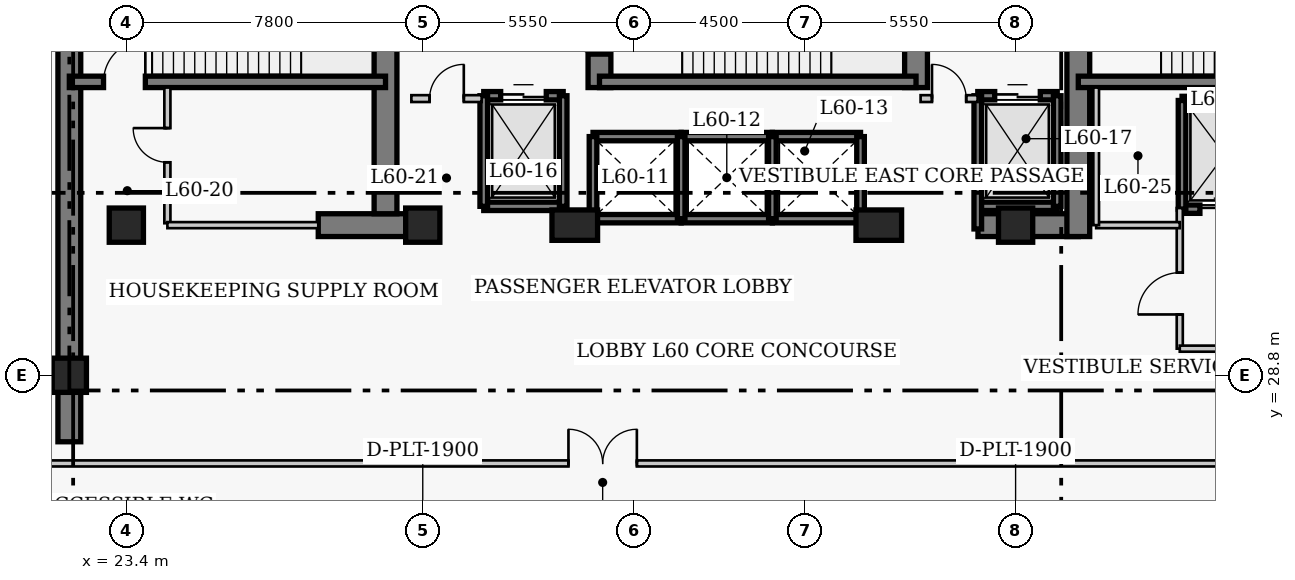
"""IFC4 building model, lengths in metres.
Left out: names, types, materials, properties, quantities, classifications, styles, units other than length and angle.
Written with IfcOpenShell. Run it as: python <this file> out.ifc"""

import sys

from ifc_helpers import new_model, si_unit, direction, frame, frame_2d, origin, origin_2d, place, context, subcontext, project, spatial, rectangle, extrude, element, fill, save


model = new_model("IFC4")
c1 = context("Model", 3, precision=1e-05, world=origin(), true_north=direction((0.0, 1.0)))
c2 = subcontext(c1, "Body", "Model", "MODEL_VIEW")
j1 = project(units=[si_unit("LENGTHUNIT", "METRE"), si_unit("PLANEANGLEUNIT", "RADIAN")], contexts=[c1])
p1 = place(None, origin())
s1 = spatial("IfcSite", under=j1, at=p1, CompositionType="ELEMENT")
p2 = place(p1, origin())
s2 = spatial("IfcBuilding", under=s1, at=p2, CompositionType="ELEMENT")
p3 = place(p2, frame((0.0, 0.0, 240.4)))
s3 = spatial("IfcBuildingStorey", under=s2, at=p3, CompositionType="ELEMENT", Elevation=240.4)
p4 = place(p3, frame((21.9, 27.05, 0.0), z_axis=(0.0, 0.0, 1.0), x_axis=(0.0, 1.0, 0.0)))
e1 = element("IfcWall", 1, at=p4, inside=s3, PredefinedType="SHEAR", context=c2, shape_type="SweptSolid", body=[
    extrude(rectangle(XDim=13.57, YDim=0.6, at=frame_2d((6.785, 0.0))), origin(), (0.0, 0.0, 1.0), 5.0),
])
p5 = place(p3, frame((28.45, 32.75, 0.0), z_axis=(0.0, 0.0, 1.0), x_axis=(1.0, 0.0, 0.0)))
e2 = element("IfcWall", 2, at=p5, inside=s3, PredefinedType="SHEAR", context=c2, shape_type="SweptSolid", body=[
    extrude(rectangle(XDim=2.4, YDim=0.6, at=frame_2d((1.2, 0.0))), origin(), (0.0, 0.0, 1.0), 5.0),
])
p6 = place(p3, frame((45.81, 32.75, 0.0), z_axis=(0.0, 0.0, 1.0), x_axis=(1.0, 0.0, 0.0)))
e3 = element("IfcWall", 3, at=p6, inside=s3, PredefinedType="SHEAR", context=c2, shape_type="SweptSolid", body=[
    extrude(rectangle(XDim=2.64, YDim=0.6, at=frame_2d((1.32, 0.0))), origin(), (0.0, 0.0, 1.0), 5.0),
])
p7 = place(p3, frame((30.22, 33.05, 0.0), z_axis=(0.0, 0.0, 1.0), x_axis=(0.0, 1.0, 0.0)))
e4 = element("IfcWall", 4, at=p7, inside=s3, PredefinedType="SHEAR", context=c2, shape_type="SweptSolid", body=[
    extrude(rectangle(XDim=7.27, YDim=0.6, at=frame_2d((3.635, 0.0))), origin(), (0.0, 0.0, 1.0), 5.0),
])
p8 = place(p3, frame((35.85, 36.37, 0.0), z_axis=(0.0, 0.0, 1.0), x_axis=(0.0, 1.0, 0.0)))
e5 = element("IfcWall", 5, at=p8, inside=s3, PredefinedType="SHEAR", context=c2, shape_type="SweptSolid", body=[
    extrude(rectangle(XDim=3.95, YDim=0.6, at=frame_2d((1.975, 0.0))), origin(), (0.0, 0.0, 1.0), 5.0),
])
p9 = place(p8, frame((0.88, 0.0, 0.0)))
e6 = element("IfcOpeningElement", 6, at=p9, cuts=e5, PredefinedType="OPENING", context=c2, shape_type="SweptSolid", body=[
    extrude(rectangle(XDim=1.1, YDim=2.15, at=frame_2d((0.55, 1.075))), frame((0.0, 0.31, 0.0), z_axis=(0.0, -1.0, 0.0), x_axis=(1.0, 0.0, 0.0)), (0.0, 0.0, 1.0), 0.62),
])
p10 = place(p3, frame((44.18, 36.37, 0.0), z_axis=(0.0, 0.0, 1.0), x_axis=(0.0, 1.0, 0.0)))
e7 = element("IfcWall", 7, at=p10, inside=s3, PredefinedType="SHEAR", context=c2, shape_type="SweptSolid", body=[
    extrude(rectangle(XDim=3.95, YDim=0.6, at=frame_2d((1.975, 0.0))), origin(), (0.0, 0.0, 1.0), 5.0),
])
p11 = place(p3, frame((48.45, 32.45, 0.0), z_axis=(0.0, 0.0, 1.0), x_axis=(0.0, 1.0, 0.0)))
e8 = element("IfcWall", 8, at=p11, inside=s3, PredefinedType="SHEAR", context=c2, shape_type="SweptSolid", body=[
    extrude(rectangle(XDim=7.87, YDim=0.6, at=frame_2d((3.935, 0.0))), origin(), (0.0, 0.0, 1.0), 5.0),
])
p12 = place(p11, frame((5.75, 0.0, 0.0)))
e9 = element("IfcOpeningElement", 9, at=p12, cuts=e8, PredefinedType="OPENING", context=c2, shape_type="SweptSolid", body=[
    extrude(rectangle(XDim=1.1, YDim=2.15, at=frame_2d((0.55, 1.075))), frame((0.0, 0.31, 0.0), z_axis=(0.0, -1.0, 0.0), x_axis=(1.0, 0.0, 0.0)), (0.0, 0.0, 1.0), 0.62),
])
p13 = place(p3, frame((21.9, 36.52, 0.0), z_axis=(0.0, 0.0, 1.0), x_axis=(1.0, 0.0, 0.0)))
e10 = element("IfcWall", 10, at=p13, inside=s3, PredefinedType="SHEAR", context=c2, shape_type="SweptSolid", body=[
    extrude(rectangle(XDim=8.32, YDim=0.3, at=frame_2d((4.16, 0.0))), origin(), (0.0, 0.0, 1.0), 5.0),
])
p14 = place(p13, frame((0.9, 0.0, 0.0)))
e11 = element("IfcOpeningElement", 11, at=p14, cuts=e10, PredefinedType="OPENING", context=c2, shape_type="SweptSolid", body=[
    extrude(rectangle(XDim=1.1, YDim=2.15, at=frame_2d((0.55, 1.075))), frame((0.0, 0.16, 0.0), z_axis=(0.0, -1.0, 0.0), x_axis=(1.0, 0.0, 0.0)), (0.0, 0.0, 1.0), 0.32),
])
p15 = place(p3, frame((35.85, 36.52, 0.0), z_axis=(0.0, 0.0, 1.0), x_axis=(1.0, 0.0, 0.0)))
e12 = element("IfcWall", 12, at=p15, inside=s3, PredefinedType="SHEAR", context=c2, shape_type="SweptSolid", body=[
    extrude(rectangle(XDim=8.33, YDim=0.3, at=frame_2d((4.165, 0.0))), origin(), (0.0, 0.0, 1.0), 5.0),
])
p16 = place(p3, frame((48.45, 36.52, 0.0), z_axis=(0.0, 0.0, 1.0), x_axis=(1.0, 0.0, 0.0)))
e13 = element("IfcWall", 13, at=p16, inside=s3, PredefinedType="SHEAR", context=c2, shape_type="SweptSolid", body=[
    extrude(rectangle(XDim=8.37, YDim=0.3, at=frame_2d((4.185, 0.0))), origin(), (0.0, 0.0, 1.0), 5.0),
])
for number, where, z_axis, x_axis in (
    (14, (21.9, 28.8, 0.0), (0.0, 0.0, 1.0), (1.0, 0.0, 0.0)),
    (15, (23.4, 32.75, 0.0), (0.0, 0.0, 1.0), (1.0, 0.0, 0.0)),
    (16, (31.2, 32.75, 0.0), (0.0, 0.0, 1.0), (1.0, 0.0, 0.0)),
):
    element("IfcColumn", number, at=place(p3, frame(where, z_axis=z_axis, x_axis=x_axis)), inside=s3, PredefinedType="COLUMN", context=c2, shape_type="SweptSolid", body=[
        extrude(rectangle(XDim=0.9, YDim=0.9, at=origin_2d()), origin(), (0.0, 0.0, 1.0), 5.0),
    ])
for number, where, z_axis, x_axis in (
    (17, (35.2, 32.75, 0.0), (0.0, 0.0, 1.0), (1.0, 0.0, 0.0)),
    (18, (43.2, 32.75, 0.0), (0.0, 0.0, 1.0), (1.0, 0.0, 0.0)),
):
    element("IfcColumn", number, at=place(p3, frame(where, z_axis=z_axis, x_axis=x_axis)), inside=s3, PredefinedType="COLUMN", context=c2, shape_type="SweptSolid", body=[
        extrude(rectangle(XDim=1.2, YDim=0.8, at=origin_2d()), origin(), (0.0, 0.0, 1.0), 5.0),
    ])
p17 = place(p3, frame((46.8, 32.75, 0.0), z_axis=(0.0, 0.0, 1.0), x_axis=(1.0, 0.0, 0.0)))
e19 = element("IfcColumn", 19, at=p17, inside=s3, PredefinedType="COLUMN", context=c2, shape_type="SweptSolid", body=[
    extrude(rectangle(XDim=0.9, YDim=0.9, at=origin_2d()), origin(), (0.0, 0.0, 1.0), 5.0),
])
for number, where, z_axis, x_axis in (
    (20, (35.68, 35.08, 0.0), (0.0, 0.0, 1.0), (1.0, 0.0, 0.0)),
    (21, (35.68, 32.92, 0.0), (0.0, 0.0, 1.0), (1.0, 0.0, 0.0)),
):
    element("IfcWall", number, at=place(p3, frame(where, z_axis=z_axis, x_axis=x_axis)), inside=s3, PredefinedType="SHEAR", context=c2, shape_type="SweptSolid", body=[
        extrude(rectangle(XDim=2.32, YDim=0.22, at=frame_2d((1.16, 0.0))), origin(), (0.0, 0.0, 1.0), 5.0),
    ])
p18 = place(p3, frame((35.68, 32.92, 0.0), z_axis=(0.0, 0.0, 1.0), x_axis=(0.0, 1.0, 0.0)))
e22 = element("IfcWall", 22, at=p18, inside=s3, PredefinedType="SHEAR", context=c2, shape_type="SweptSolid", body=[
    extrude(rectangle(XDim=2.16, YDim=0.2, at=frame_2d((1.08, 0.0))), origin(), (0.0, 0.0, 1.0), 5.0),
])
for number, where, z_axis, x_axis in (
    (23, (38.0, 35.08, 0.0), (0.0, 0.0, 1.0), (1.0, 0.0, 0.0)),
    (24, (38.0, 32.92, 0.0), (0.0, 0.0, 1.0), (1.0, 0.0, 0.0)),
):
    element("IfcWall", number, at=place(p3, frame(where, z_axis=z_axis, x_axis=x_axis)), inside=s3, PredefinedType="SHEAR", context=c2, shape_type="SweptSolid", body=[
        extrude(rectangle(XDim=2.4, YDim=0.22, at=frame_2d((1.2, 0.0))), origin(), (0.0, 0.0, 1.0), 5.0),
    ])
p19 = place(p3, frame((38.0, 32.92, 0.0), z_axis=(0.0, 0.0, 1.0), x_axis=(0.0, 1.0, 0.0)))
e25 = element("IfcWall", 25, at=p19, inside=s3, PredefinedType="SHEAR", context=c2, shape_type="SweptSolid", body=[
    extrude(rectangle(XDim=2.16, YDim=0.2, at=frame_2d((1.08, 0.0))), origin(), (0.0, 0.0, 1.0), 5.0),
])
for number, where, z_axis, x_axis in (
    (26, (40.4, 35.08, 0.0), (0.0, 0.0, 1.0), (1.0, 0.0, 0.0)),
    (27, (40.4, 32.92, 0.0), (0.0, 0.0, 1.0), (1.0, 0.0, 0.0)),
):
    element("IfcWall", number, at=place(p3, frame(where, z_axis=z_axis, x_axis=x_axis)), inside=s3, PredefinedType="SHEAR", context=c2, shape_type="SweptSolid", body=[
        extrude(rectangle(XDim=2.32, YDim=0.22, at=frame_2d((1.16, 0.0))), origin(), (0.0, 0.0, 1.0), 5.0),
    ])
for number, where, z_axis, x_axis in (
    (28, (40.4, 32.92, 0.0), (0.0, 0.0, 1.0), (0.0, 1.0, 0.0)),
    (29, (42.72, 32.92, 0.0), (0.0, 0.0, 1.0), (0.0, 1.0, 0.0)),
):
    element("IfcWall", number, at=place(p3, frame(where, z_axis=z_axis, x_axis=x_axis)), inside=s3, PredefinedType="SHEAR", context=c2, shape_type="SweptSolid", body=[
        extrude(rectangle(XDim=2.16, YDim=0.2, at=frame_2d((1.08, 0.0))), origin(), (0.0, 0.0, 1.0), 5.0),
    ])
p20 = place(p3, frame((51.18, 36.03, 0.0), z_axis=(0.0, 0.0, 1.0), x_axis=(1.0, 0.0, 0.0)))
e30 = element("IfcWall", 30, at=p20, inside=s3, PredefinedType="SHEAR", context=c2, shape_type="SweptSolid", body=[
    extrude(rectangle(XDim=2.42, YDim=0.22, at=frame_2d((1.21, 0.0))), origin(), (0.0, 0.0, 1.0), 5.0),
])
p21 = place(p3, frame((51.18, 33.17, 0.0), z_axis=(0.0, 0.0, 1.0), x_axis=(1.0, 0.0, 0.0)))
e31 = element("IfcWall", 31, at=p21, inside=s3, PredefinedType="SHEAR", context=c2, shape_type="SweptSolid", body=[
    extrude(rectangle(XDim=2.42, YDim=0.22, at=frame_2d((1.21, 0.0))), origin(), (0.0, 0.0, 1.0), 5.0),
])
p22 = place(p21, frame((0.47, 0.0, 0.0)))
e32 = element("IfcOpeningElement", 32, at=p22, cuts=e31, PredefinedType="OPENING", context=c2, shape_type="SweptSolid", body=[
    extrude(rectangle(XDim=1.3, YDim=2.15, at=frame_2d((0.65, 1.075))), frame((0.0, 0.12, 0.0), z_axis=(0.0, -1.0, 0.0), x_axis=(1.0, 0.0, 0.0)), (0.0, 0.0, 1.0), 0.24),
])
p23 = place(p3, frame((51.18, 33.17, 0.0), z_axis=(0.0, 0.0, 1.0), x_axis=(0.0, 1.0, 0.0)))
e33 = element("IfcWall", 33, at=p23, inside=s3, PredefinedType="SHEAR", context=c2, shape_type="SweptSolid", body=[
    extrude(rectangle(XDim=2.86, YDim=0.2, at=frame_2d((1.43, 0.0))), origin(), (0.0, 0.0, 1.0), 5.0),
])
p24 = place(p3, frame((32.805, 36.155, 0.0), z_axis=(0.0, 0.0, 1.0), x_axis=(1.0, 0.0, 0.0)))
e34 = element("IfcWall", 34, at=p24, inside=s3, PredefinedType="SHEAR", context=c2, shape_type="SweptSolid", body=[
    extrude(rectangle(XDim=2.09, YDim=0.22, at=frame_2d((1.045, 0.0))), origin(), (0.0, 0.0, 1.0), 5.0),
])
p25 = place(p24, frame((0.445, 0.0, 0.0)))
e35 = element("IfcOpeningElement", 35, at=p25, cuts=e34, PredefinedType="OPENING", context=c2, shape_type="SweptSolid", body=[
    extrude(rectangle(XDim=1.2, YDim=2.15, at=frame_2d((0.6, 1.075))), frame((0.0, 0.12, 0.0), z_axis=(0.0, -1.0, 0.0), x_axis=(1.0, 0.0, 0.0)), (0.0, 0.0, 1.0), 0.24),
])
p26 = place(p3, frame((32.805, 33.245, 0.0), z_axis=(0.0, 0.0, 1.0), x_axis=(1.0, 0.0, 0.0)))
e36 = element("IfcWall", 36, at=p26, inside=s3, PredefinedType="SHEAR", context=c2, shape_type="SweptSolid", body=[
    extrude(rectangle(XDim=2.09, YDim=0.22, at=frame_2d((1.045, 0.0))), origin(), (0.0, 0.0, 1.0), 5.0),
])
for number, where, z_axis, x_axis in (
    (37, (32.805, 33.245, 0.0), (0.0, 0.0, 1.0), (0.0, 1.0, 0.0)),
    (38, (34.895, 33.245, 0.0), (0.0, 0.0, 1.0), (0.0, 1.0, 0.0)),
):
    element("IfcWall", number, at=place(p3, frame(where, z_axis=z_axis, x_axis=x_axis)), inside=s3, PredefinedType="SHEAR", context=c2, shape_type="SweptSolid", body=[
        extrude(rectangle(XDim=2.91, YDim=0.2, at=frame_2d((1.455, 0.0))), origin(), (0.0, 0.0, 1.0), 5.0),
    ])
p27 = place(p3, frame((45.805, 36.155, 0.0), z_axis=(0.0, 0.0, 1.0), x_axis=(1.0, 0.0, 0.0)))
e39 = element("IfcWall", 39, at=p27, inside=s3, PredefinedType="SHEAR", context=c2, shape_type="SweptSolid", body=[
    extrude(rectangle(XDim=2.09, YDim=0.22, at=frame_2d((1.045, 0.0))), origin(), (0.0, 0.0, 1.0), 5.0),
])
p28 = place(p27, frame((0.445, 0.0, 0.0)))
e40 = element("IfcOpeningElement", 40, at=p28, cuts=e39, PredefinedType="OPENING", context=c2, shape_type="SweptSolid", body=[
    extrude(rectangle(XDim=1.2, YDim=2.15, at=frame_2d((0.6, 1.075))), frame((0.0, 0.12, 0.0), z_axis=(0.0, -1.0, 0.0), x_axis=(1.0, 0.0, 0.0)), (0.0, 0.0, 1.0), 0.24),
])
p29 = place(p3, frame((45.805, 33.245, 0.0), z_axis=(0.0, 0.0, 1.0), x_axis=(1.0, 0.0, 0.0)))
e41 = element("IfcWall", 41, at=p29, inside=s3, PredefinedType="SHEAR", context=c2, shape_type="SweptSolid", body=[
    extrude(rectangle(XDim=2.09, YDim=0.22, at=frame_2d((1.045, 0.0))), origin(), (0.0, 0.0, 1.0), 5.0),
])
p30 = place(p3, frame((45.805, 32.65, 0.0), z_axis=(0.0, 0.0, 1.0), x_axis=(0.0, 1.0, 0.0)))
e42 = element("IfcWall", 42, at=p30, inside=s3, PredefinedType="SHEAR", context=c2, shape_type="SweptSolid", body=[
    extrude(rectangle(XDim=3.505, YDim=0.2, at=frame_2d((1.752, 0.0))), origin(), (0.0, 0.0, 1.0), 5.0),
])
p31 = place(p3, frame((47.895, 33.245, 0.0), z_axis=(0.0, 0.0, 1.0), x_axis=(0.0, 1.0, 0.0)))
e43 = element("IfcWall", 43, at=p31, inside=s3, PredefinedType="SHEAR", context=c2, shape_type="SweptSolid", body=[
    extrude(rectangle(XDim=2.91, YDim=0.2, at=frame_2d((1.455, 0.0))), origin(), (0.0, 0.0, 1.0), 5.0),
])
p32 = place(p3, frame((30.9, 36.08, 0.0), z_axis=(0.0, 0.0, 1.0), x_axis=(1.0, 0.0, 0.0)))
e44 = element("IfcWall", 44, at=p32, inside=s3, PredefinedType="PARTITIONING", context=c2, shape_type="SweptSolid", body=[
    extrude(rectangle(XDim=1.85, YDim=0.18, at=frame_2d((0.925, 0.0))), origin(), (0.0, 0.0, 1.0), 4.76),
])
p33 = place(p32, frame((0.48, 0.0, 0.0)))
e45 = element("IfcOpeningElement", 45, at=p33, cuts=e44, PredefinedType="OPENING", context=c2, shape_type="SweptSolid", body=[
    extrude(rectangle(XDim=0.9, YDim=2.15, at=frame_2d((0.45, 1.075))), frame((0.0, 0.1, 0.0), z_axis=(0.0, -1.0, 0.0), x_axis=(1.0, 0.0, 0.0)), (0.0, 0.0, 1.0), 0.2),
])
p34 = place(p3, frame((44.3, 36.08, 0.0), z_axis=(0.0, 0.0, 1.0), x_axis=(1.0, 0.0, 0.0)))
e46 = element("IfcWall", 46, at=p34, inside=s3, PredefinedType="PARTITIONING", context=c2, shape_type="SweptSolid", body=[
    extrude(rectangle(XDim=1.5, YDim=0.18, at=frame_2d((0.75, 0.0))), origin(), (0.0, 0.0, 1.0), 4.76),
])
p35 = place(p34, frame((0.3, 0.0, 0.0)))
e47 = element("IfcOpeningElement", 47, at=p35, cuts=e46, PredefinedType="OPENING", context=c2, shape_type="SweptSolid", body=[
    extrude(rectangle(XDim=0.9, YDim=2.15, at=frame_2d((0.45, 1.075))), frame((0.0, 0.1, 0.0), z_axis=(0.0, -1.0, 0.0), x_axis=(1.0, 0.0, 0.0)), (0.0, 0.0, 1.0), 0.2),
])
p36 = place(p3, frame((24.48, 32.8, 0.0), z_axis=(0.0, 0.0, 1.0), x_axis=(0.0, 1.0, 0.0)))
e48 = element("IfcWall", 48, at=p36, inside=s3, PredefinedType="PARTITIONING", context=c2, shape_type="SweptSolid", body=[
    extrude(rectangle(XDim=3.57, YDim=0.16, at=frame_2d((1.785, 0.0))), origin(), (0.0, 0.0, 1.0), 4.76),
])
p37 = place(p36, frame((1.604, 0.0, 0.0)))
e49 = element("IfcOpeningElement", 49, at=p37, cuts=e48, PredefinedType="OPENING", context=c2, shape_type="SweptSolid", body=[
    extrude(rectangle(XDim=0.9, YDim=2.1, at=frame_2d((0.45, 1.05))), frame((0.0, 0.09, 0.0), z_axis=(0.0, -1.0, 0.0), x_axis=(1.0, 0.0, 0.0)), (0.0, 0.0, 1.0), 0.18),
])
p38 = place(p3, frame((51.12, 29.5, 0.0), z_axis=(0.0, 0.0, 1.0), x_axis=(0.0, 1.0, 0.0)))
e50 = element("IfcWall", 50, at=p38, inside=s3, PredefinedType="PARTITIONING", context=c2, shape_type="SweptSolid", body=[
    extrude(rectangle(XDim=3.7, YDim=0.16, at=frame_2d((1.85, 0.0))), origin(), (0.0, 0.0, 1.0), 4.76),
])
p39 = place(p38, frame((0.9, 0.0, 0.0)))
e51 = element("IfcOpeningElement", 51, at=p39, cuts=e50, PredefinedType="OPENING", context=c2, shape_type="SweptSolid", body=[
    extrude(rectangle(XDim=1.1, YDim=2.15, at=frame_2d((0.55, 1.075))), frame((0.0, 0.09, 0.0), z_axis=(0.0, -1.0, 0.0), x_axis=(1.0, 0.0, 0.0)), (0.0, 0.0, 1.0), 0.18),
])
p40 = place(p3, frame((51.12, 29.5, 0.0), z_axis=(0.0, 0.0, 1.0), x_axis=(1.0, 0.0, 0.0)))
e52 = element("IfcWall", 52, at=p40, inside=s3, PredefinedType="PARTITIONING", context=c2, shape_type="SweptSolid", body=[
    extrude(rectangle(XDim=5.63, YDim=0.16, at=frame_2d((2.815, 0.0))), origin(), (0.0, 0.0, 1.0), 4.76),
])
p41 = place(p3, frame((24.48, 32.75, 0.0), z_axis=(0.0, 0.0, 1.0), x_axis=(1.0, 0.0, 0.0)))
e53 = element("IfcWall", 53, at=p41, inside=s3, PredefinedType="PARTITIONING", context=c2, shape_type="SweptSolid", body=[
    extrude(rectangle(XDim=3.97, YDim=0.16, at=frame_2d((1.985, 0.0))), origin(), (0.0, 0.0, 1.0), 4.76),
])
p42 = place(p3, frame((48.92, 32.75, 0.0), z_axis=(0.0, 0.0, 1.0), x_axis=(1.0, 0.0, 0.0)))
e54 = element("IfcWall", 54, at=p42, inside=s3, PredefinedType="PARTITIONING", context=c2, shape_type="SweptSolid", body=[
    extrude(rectangle(XDim=2.2, YDim=0.16, at=frame_2d((1.1, 0.0))), origin(), (0.0, 0.0, 1.0), 4.76),
])
p43 = place(p3, frame((48.92, 32.75, 0.0), z_axis=(0.0, 0.0, 1.0), x_axis=(0.0, 1.0, 0.0)))
e55 = element("IfcWall", 55, at=p43, inside=s3, PredefinedType="PARTITIONING", context=c2, shape_type="SweptSolid", body=[
    extrude(rectangle(XDim=3.62, YDim=0.15, at=frame_2d((1.81, 0.0))), origin(), (0.0, 0.0, 1.0), 4.76),
])
p44 = place(p3, frame((7.0, 26.48, 0.0), z_axis=(0.0, 0.0, 1.0), x_axis=(1.0, 0.0, 0.0)))
e56 = element("IfcWall", 56, at=p44, inside=s3, PredefinedType="PARTITIONING", context=c2, shape_type="SweptSolid", body=[
    extrude(rectangle(XDim=64.0, YDim=0.16, at=frame_2d((32.0, 0.0))), origin(), (0.0, 0.0, 1.0), 4.76),
])
p45 = place(p44, frame((28.034, 0.0, 0.0)))
e57 = element("IfcOpeningElement", 57, at=p45, cuts=e56, PredefinedType="OPENING", context=c2, shape_type="SweptSolid", body=[
    extrude(rectangle(XDim=1.8, YDim=2.2, at=frame_2d((0.9, 1.1))), frame((0.0, 0.09, 0.0), z_axis=(0.0, -1.0, 0.0), x_axis=(1.0, 0.0, 0.0)), (0.0, 0.0, 1.0), 0.18),
])
p46 = place(p22, origin())
e58 = element("IfcDoor", 58, at=p46, inside=s3, OperationType="DOUBLE_DOOR_SLIDING", PredefinedType="DOOR", context=c2, shape_type="SweptSolid", body=[
    extrude(rectangle(XDim=1.3, YDim=2.15, at=frame_2d((0.65, 1.075))), frame((0.0, 0.025, 0.0), z_axis=(0.0, -1.0, 0.0), x_axis=(1.0, 0.0, 0.0)), (0.0, 0.0, 1.0), 0.05),
])
fill(e32, e58)
p47 = place(p25, origin())
e59 = element("IfcDoor", 59, at=p47, inside=s3, OperationType="DOUBLE_DOOR_SLIDING", PredefinedType="DOOR", context=c2, shape_type="SweptSolid", body=[
    extrude(rectangle(XDim=1.2, YDim=2.15, at=frame_2d((0.6, 1.075))), frame((0.0, 0.025, 0.0), z_axis=(0.0, -1.0, 0.0), x_axis=(1.0, 0.0, 0.0)), (0.0, 0.0, 1.0), 0.05),
])
fill(e35, e59)
p48 = place(p28, origin())
e60 = element("IfcDoor", 60, at=p48, inside=s3, OperationType="DOUBLE_DOOR_SLIDING", PredefinedType="DOOR", context=c2, shape_type="SweptSolid", body=[
    extrude(rectangle(XDim=1.2, YDim=2.15, at=frame_2d((0.6, 1.075))), frame((0.0, 0.025, 0.0), z_axis=(0.0, -1.0, 0.0), x_axis=(1.0, 0.0, 0.0)), (0.0, 0.0, 1.0), 0.05),
])
fill(e40, e60)
p49 = place(p33, origin())
e61 = element("IfcDoor", 61, at=p49, inside=s3, OperationType="SINGLE_SWING_RIGHT", PredefinedType="DOOR", context=c2, shape_type="SweptSolid", body=[
    extrude(rectangle(XDim=0.9, YDim=2.15, at=frame_2d((0.45, 1.075))), frame((0.0, 0.025, 0.0), z_axis=(0.0, -1.0, 0.0), x_axis=(1.0, 0.0, 0.0)), (0.0, 0.0, 1.0), 0.05),
])
fill(e45, e61)
p50 = place(p35, origin())
e62 = element("IfcDoor", 62, at=p50, inside=s3, OperationType="SINGLE_SWING_LEFT", PredefinedType="DOOR", context=c2, shape_type="SweptSolid", body=[
    extrude(rectangle(XDim=0.9, YDim=2.15, at=frame_2d((0.45, 1.075))), frame((0.0, 0.025, 0.0), z_axis=(0.0, -1.0, 0.0), x_axis=(1.0, 0.0, 0.0)), (0.0, 0.0, 1.0), 0.05),
])
fill(e47, e62)
p51 = place(p39, origin())
e63 = element("IfcDoor", 63, at=p51, inside=s3, OperationType="SINGLE_SWING_LEFT", PredefinedType="DOOR", context=c2, shape_type="SweptSolid", body=[
    extrude(rectangle(XDim=1.1, YDim=2.15, at=frame_2d((0.55, 1.075))), frame((0.0, 0.025, 0.0), z_axis=(0.0, -1.0, 0.0), x_axis=(1.0, 0.0, 0.0)), (0.0, 0.0, 1.0), 0.05),
])
fill(e51, e63)
p52 = place(p37, origin())
e64 = element("IfcDoor", 64, at=p52, inside=s3, OperationType="SINGLE_SWING_RIGHT", PredefinedType="DOOR", context=c2, shape_type="SweptSolid", body=[
    extrude(rectangle(XDim=0.9, YDim=2.1, at=frame_2d((0.45, 1.05))), frame((0.0, 0.025, 0.0), z_axis=(0.0, -1.0, 0.0), x_axis=(1.0, 0.0, 0.0)), (0.0, 0.0, 1.0), 0.05),
])
fill(e49, e64)
p53 = place(p45, origin())
e65 = element("IfcDoor", 65, at=p53, inside=s3, OperationType="DOUBLE_DOOR_SINGLE_SWING", PredefinedType="DOOR", context=c2, shape_type="SweptSolid", body=[
    extrude(rectangle(XDim=1.8, YDim=2.2, at=frame_2d((0.9, 1.1))), frame((0.0, 0.025, 0.0), z_axis=(0.0, -1.0, 0.0), x_axis=(1.0, 0.0, 0.0)), (0.0, 0.0, 1.0), 0.05),
])
fill(e57, e65)
p54 = place(p14, origin())
e66 = element("IfcDoor", 66, at=p54, inside=s3, OperationType="SINGLE_SWING_RIGHT", PredefinedType="DOOR", context=c2, shape_type="SweptSolid", body=[
    extrude(rectangle(XDim=1.1, YDim=2.15, at=frame_2d((0.55, 1.075))), frame((0.0, 0.025, 0.0), z_axis=(0.0, -1.0, 0.0), x_axis=(1.0, 0.0, 0.0)), (0.0, 0.0, 1.0), 0.05),
])
fill(e11, e66)
p55 = place(p9, origin())
e67 = element("IfcDoor", 67, at=p55, inside=s3, OperationType="SINGLE_SWING_RIGHT", PredefinedType="DOOR", context=c2, shape_type="SweptSolid", body=[
    extrude(rectangle(XDim=1.1, YDim=2.15, at=frame_2d((0.55, 1.075))), frame((0.0, 0.025, 0.0), z_axis=(0.0, -1.0, 0.0), x_axis=(1.0, 0.0, 0.0)), (0.0, 0.0, 1.0), 0.05),
])
fill(e6, e67)
save(model, sys.argv[1])
